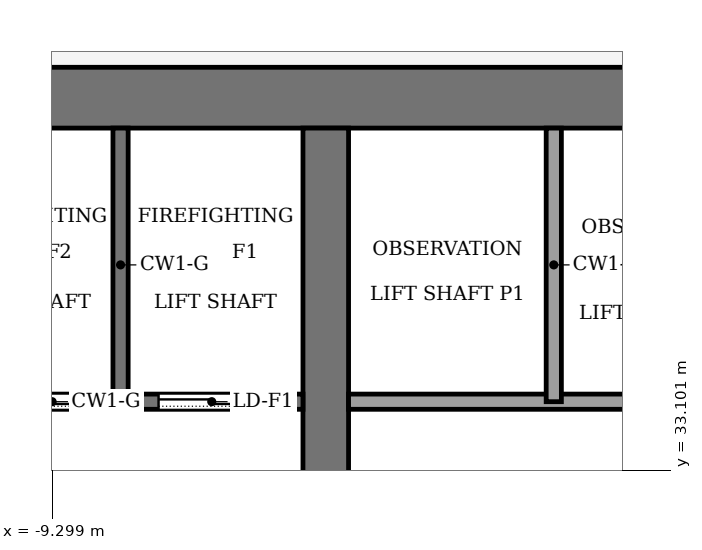
"""IFC4 building model, lengths in metres.
Left out: names, types, materials, properties, quantities, classifications, styles, units other than length and angle.
Written with IfcOpenShell. Run it as: python <this file> out.ifc"""

import sys

from ifc_helpers import new_model, si_unit, direction, frame, frame_2d, origin, place, context, subcontext, project, spatial, rectangle, extrude, element, fill, save


model = new_model("IFC4")
c1 = context("Model", 3, precision=1e-05, world=origin(), true_north=direction((0.0, 1.0)))
c2 = subcontext(c1, "Body", "Model", "MODEL_VIEW")
j1 = project(units=[si_unit("LENGTHUNIT", "METRE"), si_unit("PLANEANGLEUNIT", "RADIAN")], contexts=[c1])
p1 = place(None, origin())
s1 = spatial("IfcSite", under=j1, at=p1, CompositionType="ELEMENT")
p2 = place(p1, origin())
s2 = spatial("IfcBuilding", under=s1, at=p2, CompositionType="ELEMENT")
p3 = place(p2, frame((0.0, 0.0, 238.0)))
s3 = spatial("IfcBuildingStorey", under=s2, at=p3, CompositionType="ELEMENT", Elevation=238.0)
p4 = place(p3, frame((-13.4, 38.0, -0.13), z_axis=(0.0, 0.0, 1.0), x_axis=(1.0, 0.0, 0.0)))
e1 = element("IfcWall", 1, at=p4, inside=s3, PredefinedType="SHEAR", context=c2, shape_type="SweptSolid", body=[
    extrude(rectangle(XDim=26.8, YDim=0.8, at=frame_2d((13.4, 0.0))), origin(), (0.0, 0.0, 1.0), 4.0),
])
p5 = place(p3, frame((-5.7, 18.4, -0.13), z_axis=(0.0, 0.0, 1.0), x_axis=(0.0, 1.0, 0.0)))
e2 = element("IfcWall", 2, at=p5, inside=s3, PredefinedType="SHEAR", context=c2, shape_type="SweptSolid", body=[
    extrude(rectangle(XDim=19.2, YDim=0.6, at=frame_2d((9.6, 0.0))), origin(), (0.0, 0.0, 1.0), 4.0),
])
p6 = place(p5, frame((8.35, 0.0, 0.13)))
e3 = element("IfcOpeningElement", 3, at=p6, cuts=e2, PredefinedType="OPENING", context=c2, shape_type="SweptSolid", body=[
    extrude(rectangle(XDim=0.9, YDim=2.1, at=frame_2d((0.45, 1.05))), frame((0.0, 0.31, 0.0), z_axis=(0.0, -1.0, 0.0), x_axis=(1.0, 0.0, 0.0)), (0.0, 0.0, 1.0), 0.62),
])
p7 = place(p3, frame((-12.6, 34.0, 0.0), z_axis=(0.0, 0.0, 1.0), x_axis=(1.0, 0.0, 0.0)))
e4 = element("IfcWall", 4, at=p7, inside=s3, PredefinedType="PARTITIONING", context=c2, shape_type="SweptSolid", body=[
    extrude(rectangle(XDim=6.6, YDim=0.2, at=frame_2d((3.3, 0.0))), origin(), (0.0, 0.0, 1.0), 3.87),
])
p8 = place(p7, frame((4.7, 0.0, 0.0)))
e5 = element("IfcOpeningElement", 5, at=p8, cuts=e4, PredefinedType="OPENING", context=c2, shape_type="SweptSolid", body=[
    extrude(rectangle(XDim=1.4, YDim=2.2, at=frame_2d((0.7, 1.1))), frame((0.0, 0.11, 0.0), z_axis=(0.0, -1.0, 0.0), x_axis=(1.0, 0.0, 0.0)), (0.0, 0.0, 1.0), 0.22),
])
p9 = place(p7, frame((2.3, 0.0, 0.0)))
e6 = element("IfcOpeningElement", 6, at=p9, cuts=e4, PredefinedType="OPENING", context=c2, shape_type="SweptSolid", body=[
    extrude(rectangle(XDim=1.4, YDim=2.2, at=frame_2d((0.7, 1.1))), frame((0.0, 0.11, 0.0), z_axis=(0.0, -1.0, 0.0), x_axis=(1.0, 0.0, 0.0)), (0.0, 0.0, 1.0), 0.22),
])
p10 = place(p7, frame((0.45, 0.0, 0.0)))
e7 = element("IfcOpeningElement", 7, at=p10, cuts=e4, PredefinedType="OPENING", context=c2, shape_type="SweptSolid", body=[
    extrude(rectangle(XDim=0.9, YDim=2.1, at=frame_2d((0.45, 1.05))), frame((0.0, 0.11, 0.0), z_axis=(0.0, -1.0, 0.0), x_axis=(1.0, 0.0, 0.0)), (0.0, 0.0, 1.0), 0.22),
])
p11 = place(p3, frame((-5.4, 34.0, 0.0), z_axis=(0.0, 0.0, 1.0), x_axis=(1.0, 0.0, 0.0)))
e8 = element("IfcWall", 8, at=p11, inside=s3, PredefinedType="PARTITIONING", context=c2, shape_type="SweptSolid", body=[
    extrude(rectangle(XDim=10.8, YDim=0.2, at=frame_2d((5.4, 0.0))), origin(), (0.0, 0.0, 1.0), 3.87),
])
p12 = place(p11, frame((6.15, 0.0, 0.0)))
e9 = element("IfcOpeningElement", 9, at=p12, cuts=e8, PredefinedType="OPENING", context=c2, shape_type="SweptSolid", body=[
    extrude(rectangle(XDim=1.2, YDim=2.2, at=frame_2d((0.6, 1.1))), frame((0.0, 0.11, 0.0), z_axis=(0.0, -1.0, 0.0), x_axis=(1.0, 0.0, 0.0)), (0.0, 0.0, 1.0), 0.22),
])
p13 = place(p11, frame((8.95, 0.0, 0.0)))
e10 = element("IfcOpeningElement", 10, at=p13, cuts=e8, PredefinedType="OPENING", context=c2, shape_type="SweptSolid", body=[
    extrude(rectangle(XDim=1.0, YDim=2.1, at=frame_2d((0.5, 1.05))), frame((0.0, 0.11, 0.0), z_axis=(0.0, -1.0, 0.0), x_axis=(1.0, 0.0, 0.0)), (0.0, 0.0, 1.0), 0.22),
])
for number, where, z_axis, x_axis in (
    (11, (-8.4, 34.0, 0.0), (0.0, 0.0, 1.0), (0.0, 1.0, 0.0)),
    (12, (-2.7, 34.0, 0.0), (0.0, 0.0, 1.0), (0.0, 1.0, 0.0)),
):
    element("IfcWall", number, at=place(p3, frame(where, z_axis=z_axis, x_axis=x_axis)), inside=s3, PredefinedType="PARTITIONING", context=c2, shape_type="SweptSolid", body=[
        extrude(rectangle(XDim=3.6, YDim=0.2, at=frame_2d((1.8, 0.0))), origin(), (0.0, 0.0, 1.0), 3.87),
    ])
p14 = place(p8, origin())
e13 = element("IfcDoor", 13, at=p14, inside=s3, OperationType="SLIDING_TO_LEFT", PredefinedType="DOOR", context=c2, shape_type="SweptSolid", body=[
    extrude(rectangle(XDim=1.4, YDim=2.2, at=frame_2d((0.7, 1.1))), frame((0.0, 0.025, 0.0), z_axis=(0.0, -1.0, 0.0), x_axis=(1.0, 0.0, 0.0)), (0.0, 0.0, 1.0), 0.05),
])
fill(e5, e13)
p15 = place(p9, origin())
e14 = element("IfcDoor", 14, at=p15, inside=s3, OperationType="SLIDING_TO_LEFT", PredefinedType="DOOR", context=c2, shape_type="SweptSolid", body=[
    extrude(rectangle(XDim=1.4, YDim=2.2, at=frame_2d((0.7, 1.1))), frame((0.0, 0.025, 0.0), z_axis=(0.0, -1.0, 0.0), x_axis=(1.0, 0.0, 0.0)), (0.0, 0.0, 1.0), 0.05),
])
fill(e6, e14)
save(model, sys.argv[1])
